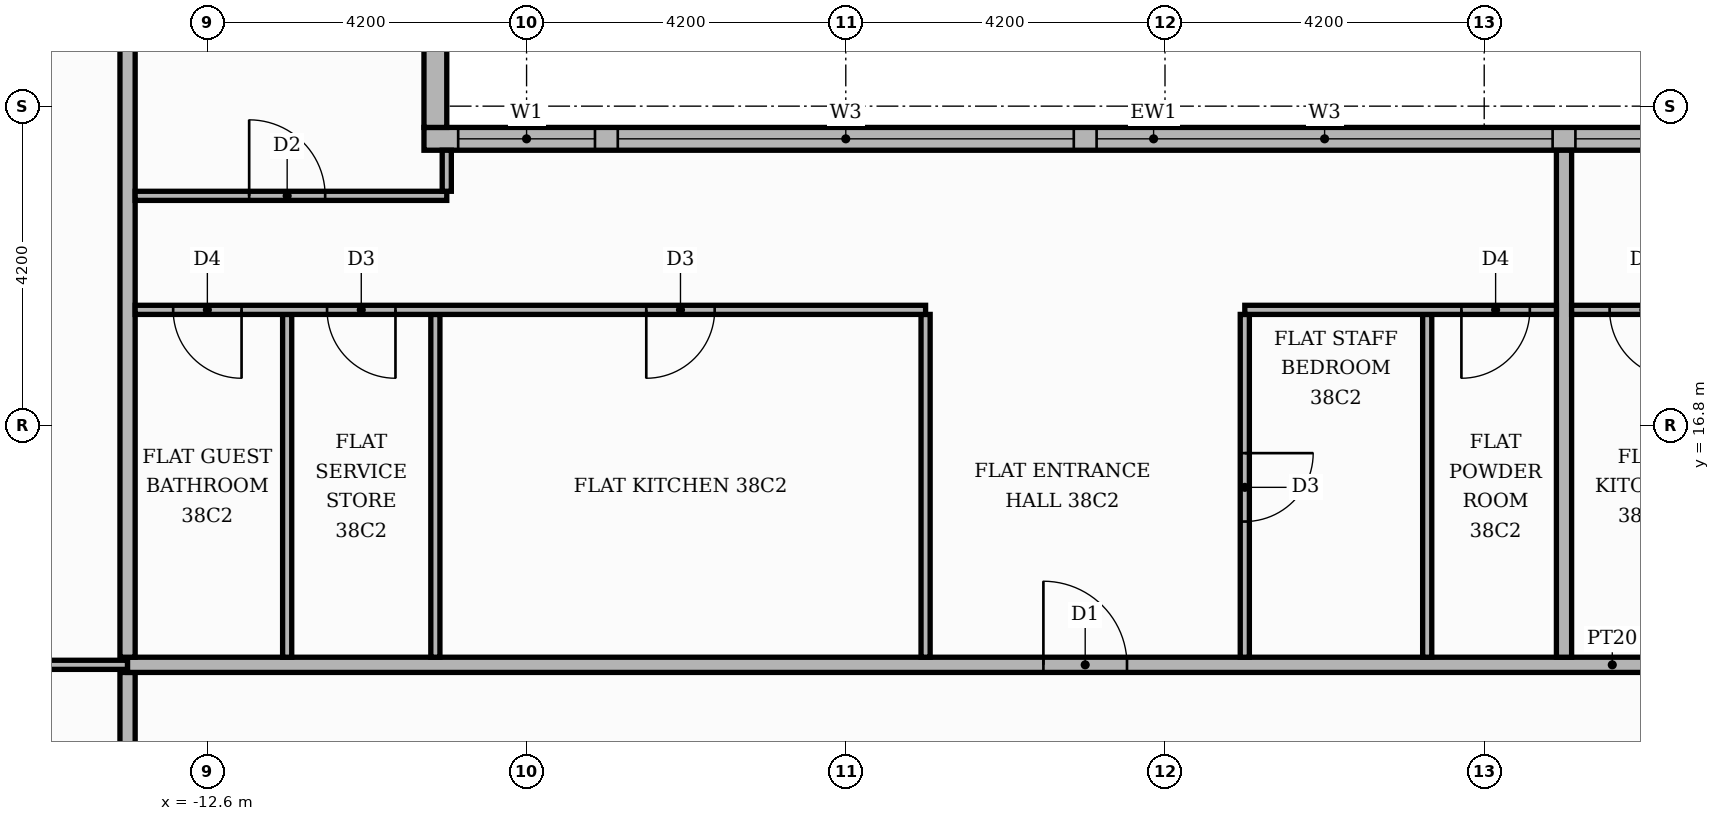
"""IFC4 building model, lengths in metres.
Left out: names, types, materials, properties, quantities, classifications, styles, units other than length and angle.
Written with IfcOpenShell. Run it as: python <this file> out.ifc"""

import sys

from ifc_helpers import new_model, si_unit, direction, frame, frame_2d, origin, place, context, subcontext, project, spatial, rectangle, extrude, element, fill, save


model = new_model("IFC4")
c1 = context("Model", 3, precision=1e-05, world=origin(), true_north=direction((0.0, 1.0)))
c2 = subcontext(c1, "Body", "Model", "MODEL_VIEW")
j1 = project(units=[si_unit("LENGTHUNIT", "METRE"), si_unit("PLANEANGLEUNIT", "RADIAN")], contexts=[c1])
p1 = place(None, origin())
s1 = spatial("IfcSite", under=j1, at=p1, CompositionType="ELEMENT")
p2 = place(p1, origin())
s2 = spatial("IfcBuilding", under=s1, at=p2, CompositionType="ELEMENT")
p3 = place(p2, frame((0.0, 0.0, 161.1)))
s3 = spatial("IfcBuildingStorey", under=s2, at=p3, CompositionType="ELEMENT", Elevation=161.1)
p4 = place(p3, frame((9.45, 20.57, 0.0), z_axis=(0.0, 0.0, 1.0), x_axis=(-1.0, 0.0, 0.0)))
e1 = element("IfcWall", 1, at=p4, inside=s3, PredefinedType="STANDARD", context=c2, shape_type="SweptSolid", body=[
    extrude(rectangle(XDim=19.2, YDim=0.3, at=frame_2d((9.6, 0.0))), origin(), (0.0, 0.0, 1.0), 3.48),
])
p5 = place(p4, frame((0.15, 0.0, 0.9)))
e2 = element("IfcOpeningElement", 2, at=p5, cuts=e1, PredefinedType="OPENING", context=c2, shape_type="SweptSolid", body=[
    extrude(rectangle(XDim=3.9, YDim=2.1, at=frame_2d((1.95, 1.05))), frame((0.0, 0.16, 0.0), z_axis=(0.0, -1.0, 0.0), x_axis=(1.0, 0.0, 0.0)), (0.0, 0.0, 1.0), 0.32),
])
p6 = place(p4, frame((4.35, 0.0, 0.9)))
e3 = element("IfcOpeningElement", 3, at=p6, cuts=e1, PredefinedType="OPENING", context=c2, shape_type="SweptSolid", body=[
    extrude(rectangle(XDim=6.0, YDim=2.1, at=frame_2d((3.0, 1.05))), frame((0.0, 0.16, 0.0), z_axis=(0.0, -1.0, 0.0), x_axis=(1.0, 0.0, 0.0)), (0.0, 0.0, 1.0), 0.32),
])
p7 = place(p4, frame((10.65, 0.0, 0.9)))
e4 = element("IfcOpeningElement", 4, at=p7, cuts=e1, PredefinedType="OPENING", context=c2, shape_type="SweptSolid", body=[
    extrude(rectangle(XDim=6.0, YDim=2.1, at=frame_2d((3.0, 1.05))), frame((0.0, 0.16, 0.0), z_axis=(0.0, -1.0, 0.0), x_axis=(1.0, 0.0, 0.0)), (0.0, 0.0, 1.0), 0.32),
])
p8 = place(p4, frame((16.95, 0.0, 0.9)))
e5 = element("IfcOpeningElement", 5, at=p8, cuts=e1, PredefinedType="OPENING", context=c2, shape_type="SweptSolid", body=[
    extrude(rectangle(XDim=1.8, YDim=2.1, at=frame_2d((0.9, 1.05))), frame((0.0, 0.16, 0.0), z_axis=(0.0, -1.0, 0.0), x_axis=(1.0, 0.0, 0.0)), (0.0, 0.0, 1.0), 0.32),
])
p9 = place(p3, frame((-9.6, 20.72, 0.0), z_axis=(0.0, 0.0, 1.0), x_axis=(0.0, 1.0, 0.0)))
e6 = element("IfcWall", 6, at=p9, inside=s3, PredefinedType="STANDARD", context=c2, shape_type="SweptSolid", body=[
    extrude(rectangle(XDim=5.0, YDim=0.3, at=frame_2d((2.5, 0.0))), origin(), (0.0, 0.0, 1.0), 3.48),
])
p10 = place(p9, frame((1.48, 0.0, 0.9)))
e7 = element("IfcOpeningElement", 7, at=p10, cuts=e6, PredefinedType="OPENING", context=c2, shape_type="SweptSolid", body=[
    extrude(rectangle(XDim=1.8, YDim=2.1, at=frame_2d((0.9, 1.05))), frame((0.0, 0.16, 0.0), z_axis=(0.0, -1.0, 0.0), x_axis=(1.0, 0.0, 0.0)), (0.0, 0.0, 1.0), 0.32),
])
p11 = place(p3, frame((-13.65, 11.1, 0.0), z_axis=(0.0, 0.0, 1.0), x_axis=(0.0, 1.0, 0.0)))
e8 = element("IfcWall", 8, at=p11, inside=s3, PredefinedType="PARTITIONING", context=c2, shape_type="SweptSolid", body=[
    extrude(rectangle(XDim=2.45, YDim=0.2, at=frame_2d((1.225, 0.0))), origin(), (0.0, 0.0, 1.0), 3.48),
])
p12 = place(p3, frame((-19.82, 13.65, 0.0), z_axis=(0.0, 0.0, 1.0), x_axis=(1.0, 0.0, 0.0)))
e9 = element("IfcWall", 9, at=p12, inside=s3, PredefinedType="PARTITIONING", context=c2, shape_type="SweptSolid", body=[
    extrude(rectangle(XDim=6.17, YDim=0.12, at=frame_2d((3.085, 0.0))), origin(), (0.0, 0.0, 1.0), 3.48),
])
p13 = place(p12, frame((2.635, 0.0, 0.0)))
e10 = element("IfcOpeningElement", 10, at=p13, cuts=e9, PredefinedType="OPENING", context=c2, shape_type="SweptSolid", body=[
    extrude(rectangle(XDim=0.9, YDim=2.1, at=frame_2d((0.45, 1.05))), frame((0.0, 0.07, 0.0), z_axis=(0.0, -1.0, 0.0), x_axis=(1.0, 0.0, 0.0)), (0.0, 0.0, 1.0), 0.14),
])
p14 = place(p3, frame((-13.65, 13.65, 0.0), z_axis=(0.0, 0.0, 1.0), x_axis=(1.0, 0.0, 0.0)))
e11 = element("IfcWall", 11, at=p14, inside=s3, PredefinedType="PARTITIONING", context=c2, shape_type="SweptSolid", body=[
    extrude(rectangle(XDim=39.07, YDim=0.2, at=frame_2d((19.535, 0.0))), origin(), (0.0, 0.0, 1.0), 3.48),
])
p15 = place(p14, frame((24.65, 0.0, 0.0)))
e12 = element("IfcOpeningElement", 12, at=p15, cuts=e11, PredefinedType="OPENING", context=c2, shape_type="SweptSolid", body=[
    extrude(rectangle(XDim=1.1, YDim=2.4, at=frame_2d((0.55, 1.2))), frame((0.0, 0.11, 0.0), z_axis=(0.0, -1.0, 0.0), x_axis=(1.0, 0.0, 0.0)), (0.0, 0.0, 1.0), 0.22),
])
p16 = place(p14, frame((12.05, 0.0, 0.0)))
e13 = element("IfcOpeningElement", 13, at=p16, cuts=e11, PredefinedType="OPENING", context=c2, shape_type="SweptSolid", body=[
    extrude(rectangle(XDim=1.1, YDim=2.4, at=frame_2d((0.55, 1.2))), frame((0.0, 0.11, 0.0), z_axis=(0.0, -1.0, 0.0), x_axis=(1.0, 0.0, 0.0)), (0.0, 0.0, 1.0), 0.22),
])
p17 = place(p3, frame((-13.65, 13.75, 0.0), z_axis=(0.0, 0.0, 1.0), x_axis=(0.0, 1.0, 0.0)))
e14 = element("IfcWall", 14, at=p17, inside=s3, PredefinedType="PARTITIONING", context=c2, shape_type="SweptSolid", body=[
    extrude(rectangle(XDim=11.67, YDim=0.2, at=frame_2d((5.835, 0.0))), origin(), (0.0, 0.0, 1.0), 3.48),
])
for number, where, z_axis, x_axis in (
    (15, (-11.55, 13.75, 0.0), (0.0, 0.0, 1.0), (0.0, 1.0, 0.0)),
    (16, (-9.6, 13.75, 0.0), (0.0, 0.0, 1.0), (0.0, 1.0, 0.0)),
    (17, (-3.15, 13.75, 0.0), (0.0, 0.0, 1.0), (0.0, 1.0, 0.0)),
):
    element("IfcWall", number, at=place(p3, frame(where, z_axis=z_axis, x_axis=x_axis)), inside=s3, PredefinedType="PARTITIONING", context=c2, shape_type="SweptSolid", body=[
        extrude(rectangle(XDim=4.51, YDim=0.12, at=frame_2d((2.255, 0.0))), origin(), (0.0, 0.0, 1.0), 3.48),
    ])
p18 = place(p3, frame((1.05, 13.75, 0.0), z_axis=(0.0, 0.0, 1.0), x_axis=(0.0, 1.0, 0.0)))
e18 = element("IfcWall", 18, at=p18, inside=s3, PredefinedType="PARTITIONING", context=c2, shape_type="SweptSolid", body=[
    extrude(rectangle(XDim=4.51, YDim=0.12, at=frame_2d((2.255, 0.0))), origin(), (0.0, 0.0, 1.0), 3.48),
])
p19 = place(p18, frame((1.785, 0.0, 0.0)))
e19 = element("IfcOpeningElement", 19, at=p19, cuts=e18, PredefinedType="OPENING", context=c2, shape_type="SweptSolid", body=[
    extrude(rectangle(XDim=0.9, YDim=2.1, at=frame_2d((0.45, 1.05))), frame((0.0, 0.07, 0.0), z_axis=(0.0, -1.0, 0.0), x_axis=(1.0, 0.0, 0.0)), (0.0, 0.0, 1.0), 0.14),
])
p20 = place(p3, frame((3.45, 13.75, 0.0), z_axis=(0.0, 0.0, 1.0), x_axis=(0.0, 1.0, 0.0)))
e20 = element("IfcWall", 20, at=p20, inside=s3, PredefinedType="PARTITIONING", context=c2, shape_type="SweptSolid", body=[
    extrude(rectangle(XDim=4.51, YDim=0.12, at=frame_2d((2.255, 0.0))), origin(), (0.0, 0.0, 1.0), 3.48),
])
p21 = place(p3, frame((5.25, 13.75, 0.0), z_axis=(0.0, 0.0, 1.0), x_axis=(0.0, 1.0, 0.0)))
e21 = element("IfcWall", 21, at=p21, inside=s3, PredefinedType="PARTITIONING", context=c2, shape_type="SweptSolid", body=[
    extrude(rectangle(XDim=6.67, YDim=0.2, at=frame_2d((3.335, 0.0))), origin(), (0.0, 0.0, 1.0), 3.48),
])
p22 = place(p3, frame((-13.55, 18.32, 0.0), z_axis=(0.0, 0.0, 1.0), x_axis=(1.0, 0.0, 0.0)))
e22 = element("IfcWall", 22, at=p22, inside=s3, PredefinedType="PARTITIONING", context=c2, shape_type="SweptSolid", body=[
    extrude(rectangle(XDim=10.4, YDim=0.12, at=frame_2d((5.2, 0.0))), origin(), (0.0, 0.0, 1.0), 3.48),
])
p23 = place(p22, frame((6.725, 0.0, 0.0)))
e23 = element("IfcOpeningElement", 23, at=p23, cuts=e22, PredefinedType="OPENING", context=c2, shape_type="SweptSolid", body=[
    extrude(rectangle(XDim=0.9, YDim=2.1, at=frame_2d((0.45, 1.05))), frame((0.0, 0.07, 0.0), z_axis=(0.0, -1.0, 0.0), x_axis=(1.0, 0.0, 0.0)), (0.0, 0.0, 1.0), 0.14),
])
p24 = place(p22, frame((2.525, 0.0, 0.0)))
e24 = element("IfcOpeningElement", 24, at=p24, cuts=e22, PredefinedType="OPENING", context=c2, shape_type="SweptSolid", body=[
    extrude(rectangle(XDim=0.9, YDim=2.1, at=frame_2d((0.45, 1.05))), frame((0.0, 0.07, 0.0), z_axis=(0.0, -1.0, 0.0), x_axis=(1.0, 0.0, 0.0)), (0.0, 0.0, 1.0), 0.14),
])
p25 = place(p22, frame((0.5, 0.0, 0.0)))
e25 = element("IfcOpeningElement", 25, at=p25, cuts=e22, PredefinedType="OPENING", context=c2, shape_type="SweptSolid", body=[
    extrude(rectangle(XDim=0.9, YDim=2.1, at=frame_2d((0.45, 1.05))), frame((0.0, 0.07, 0.0), z_axis=(0.0, -1.0, 0.0), x_axis=(1.0, 0.0, 0.0)), (0.0, 0.0, 1.0), 0.14),
])
p26 = place(p3, frame((1.05, 18.32, 0.0), z_axis=(0.0, 0.0, 1.0), x_axis=(1.0, 0.0, 0.0)))
e26 = element("IfcWall", 26, at=p26, inside=s3, PredefinedType="PARTITIONING", context=c2, shape_type="SweptSolid", body=[
    extrude(rectangle(XDim=4.1, YDim=0.12, at=frame_2d((2.05, 0.0))), origin(), (0.0, 0.0, 1.0), 3.48),
])
p27 = place(p26, frame((2.85, 0.0, 0.0)))
e27 = element("IfcOpeningElement", 27, at=p27, cuts=e26, PredefinedType="OPENING", context=c2, shape_type="SweptSolid", body=[
    extrude(rectangle(XDim=0.9, YDim=2.1, at=frame_2d((0.45, 1.05))), frame((0.0, 0.07, 0.0), z_axis=(0.0, -1.0, 0.0), x_axis=(1.0, 0.0, 0.0)), (0.0, 0.0, 1.0), 0.14),
])
p28 = place(p3, frame((5.35, 18.32, 0.0), z_axis=(0.0, 0.0, 1.0), x_axis=(1.0, 0.0, 0.0)))
e28 = element("IfcWall", 28, at=p28, inside=s3, PredefinedType="PARTITIONING", context=c2, shape_type="SweptSolid", body=[
    extrude(rectangle(XDim=4.1, YDim=0.12, at=frame_2d((2.05, 0.0))), origin(), (0.0, 0.0, 1.0), 3.48),
])
p29 = place(p28, frame((0.5, 0.0, 0.0)))
e29 = element("IfcOpeningElement", 29, at=p29, cuts=e28, PredefinedType="OPENING", context=c2, shape_type="SweptSolid", body=[
    extrude(rectangle(XDim=0.9, YDim=2.1, at=frame_2d((0.45, 1.05))), frame((0.0, 0.07, 0.0), z_axis=(0.0, -1.0, 0.0), x_axis=(1.0, 0.0, 0.0)), (0.0, 0.0, 1.0), 0.14),
])
p30 = place(p3, frame((-13.55, 19.82, 0.0), z_axis=(0.0, 0.0, 1.0), x_axis=(1.0, 0.0, 0.0)))
e30 = element("IfcWall", 30, at=p30, inside=s3, PredefinedType="PARTITIONING", context=c2, shape_type="SweptSolid", body=[
    extrude(rectangle(XDim=4.1, YDim=0.12, at=frame_2d((2.05, 0.0))), origin(), (0.0, 0.0, 1.0), 3.48),
])
p31 = place(p30, frame((1.5, 0.0, 0.0)))
e31 = element("IfcOpeningElement", 31, at=p31, cuts=e30, PredefinedType="OPENING", context=c2, shape_type="SweptSolid", body=[
    extrude(rectangle(XDim=1.0, YDim=2.1, at=frame_2d((0.5, 1.05))), frame((0.0, 0.07, 0.0), z_axis=(0.0, -1.0, 0.0), x_axis=(1.0, 0.0, 0.0)), (0.0, 0.0, 1.0), 0.14),
])
p32 = place(p3, frame((-9.45, 19.88, 0.0), z_axis=(0.0, 0.0, 1.0), x_axis=(0.0, 1.0, 0.0)))
e32 = element("IfcWall", 32, at=p32, inside=s3, PredefinedType="PARTITIONING", context=c2, shape_type="SweptSolid", body=[
    extrude(rectangle(XDim=0.54, YDim=0.12, at=frame_2d((0.27, 0.0))), origin(), (0.0, 0.0, 1.0), 3.48),
])
p33 = place(p5, origin())
e33 = element("IfcWindow", 33, at=p33, inside=s3, PartitioningType="SINGLE_PANEL", PredefinedType="WINDOW", context=c2, shape_type="SweptSolid", body=[
    extrude(rectangle(XDim=3.9, YDim=2.1, at=frame_2d((1.95, 1.05))), frame((0.0, 0.03, 0.0), z_axis=(0.0, -1.0, 0.0), x_axis=(1.0, 0.0, 0.0)), (0.0, 0.0, 1.0), 0.06),
])
fill(e2, e33)
p34 = place(p6, origin())
e34 = element("IfcWindow", 34, at=p34, inside=s3, PartitioningType="SINGLE_PANEL", PredefinedType="WINDOW", context=c2, shape_type="SweptSolid", body=[
    extrude(rectangle(XDim=6.0, YDim=2.1, at=frame_2d((3.0, 1.05))), frame((0.0, 0.03, 0.0), z_axis=(0.0, -1.0, 0.0), x_axis=(1.0, 0.0, 0.0)), (0.0, 0.0, 1.0), 0.06),
])
fill(e3, e34)
p35 = place(p7, origin())
e35 = element("IfcWindow", 35, at=p35, inside=s3, PartitioningType="SINGLE_PANEL", PredefinedType="WINDOW", context=c2, shape_type="SweptSolid", body=[
    extrude(rectangle(XDim=6.0, YDim=2.1, at=frame_2d((3.0, 1.05))), frame((0.0, 0.03, 0.0), z_axis=(0.0, -1.0, 0.0), x_axis=(1.0, 0.0, 0.0)), (0.0, 0.0, 1.0), 0.06),
])
fill(e4, e35)
p36 = place(p8, origin())
e36 = element("IfcWindow", 36, at=p36, inside=s3, PartitioningType="SINGLE_PANEL", PredefinedType="WINDOW", context=c2, shape_type="SweptSolid", body=[
    extrude(rectangle(XDim=1.8, YDim=2.1, at=frame_2d((0.9, 1.05))), frame((0.0, 0.03, 0.0), z_axis=(0.0, -1.0, 0.0), x_axis=(1.0, 0.0, 0.0)), (0.0, 0.0, 1.0), 0.06),
])
fill(e5, e36)
p37 = place(p29, frame((0.9, 0.0, 0.0), z_axis=(0.0, 0.0, 1.0), x_axis=(-1.0, 0.0, 0.0)))
e37 = element("IfcDoor", 37, at=p37, inside=s3, OperationType="SINGLE_SWING_RIGHT", PredefinedType="DOOR", context=c2, shape_type="SweptSolid", body=[
    extrude(rectangle(XDim=0.9, YDim=2.1, at=frame_2d((0.45, 1.05))), frame((0.0, 0.025, 0.0), z_axis=(0.0, -1.0, 0.0), x_axis=(1.0, 0.0, 0.0)), (0.0, 0.0, 1.0), 0.05),
])
fill(e29, e37)
p38 = place(p16, origin())
e38 = element("IfcDoor", 38, at=p38, inside=s3, OperationType="SINGLE_SWING_LEFT", PredefinedType="DOOR", context=c2, shape_type="SweptSolid", body=[
    extrude(rectangle(XDim=1.1, YDim=2.4, at=frame_2d((0.55, 1.2))), frame((0.0, 0.025, 0.0), z_axis=(0.0, -1.0, 0.0), x_axis=(1.0, 0.0, 0.0)), (0.0, 0.0, 1.0), 0.05),
])
fill(e13, e38)
p39 = place(p27, frame((0.9, 0.0, 0.0), z_axis=(0.0, 0.0, 1.0), x_axis=(-1.0, 0.0, 0.0)))
e39 = element("IfcDoor", 39, at=p39, inside=s3, OperationType="SINGLE_SWING_LEFT", PredefinedType="DOOR", context=c2, shape_type="SweptSolid", body=[
    extrude(rectangle(XDim=0.9, YDim=2.1, at=frame_2d((0.45, 1.05))), frame((0.0, 0.025, 0.0), z_axis=(0.0, -1.0, 0.0), x_axis=(1.0, 0.0, 0.0)), (0.0, 0.0, 1.0), 0.05),
])
fill(e27, e39)
p40 = place(p19, frame((0.9, 0.0, 0.0), z_axis=(0.0, 0.0, 1.0), x_axis=(-1.0, 0.0, 0.0)))
e40 = element("IfcDoor", 40, at=p40, inside=s3, OperationType="SINGLE_SWING_RIGHT", PredefinedType="DOOR", context=c2, shape_type="SweptSolid", body=[
    extrude(rectangle(XDim=0.9, YDim=2.1, at=frame_2d((0.45, 1.05))), frame((0.0, 0.025, 0.0), z_axis=(0.0, -1.0, 0.0), x_axis=(1.0, 0.0, 0.0)), (0.0, 0.0, 1.0), 0.05),
])
fill(e19, e40)
p41 = place(p23, frame((0.9, 0.0, 0.0), z_axis=(0.0, 0.0, 1.0), x_axis=(-1.0, 0.0, 0.0)))
e41 = element("IfcDoor", 41, at=p41, inside=s3, OperationType="SINGLE_SWING_LEFT", PredefinedType="DOOR", context=c2, shape_type="SweptSolid", body=[
    extrude(rectangle(XDim=0.9, YDim=2.1, at=frame_2d((0.45, 1.05))), frame((0.0, 0.025, 0.0), z_axis=(0.0, -1.0, 0.0), x_axis=(1.0, 0.0, 0.0)), (0.0, 0.0, 1.0), 0.05),
])
fill(e23, e41)
p42 = place(p24, frame((0.9, 0.0, 0.0), z_axis=(0.0, 0.0, 1.0), x_axis=(-1.0, 0.0, 0.0)))
e42 = element("IfcDoor", 42, at=p42, inside=s3, OperationType="SINGLE_SWING_RIGHT", PredefinedType="DOOR", context=c2, shape_type="SweptSolid", body=[
    extrude(rectangle(XDim=0.9, YDim=2.1, at=frame_2d((0.45, 1.05))), frame((0.0, 0.025, 0.0), z_axis=(0.0, -1.0, 0.0), x_axis=(1.0, 0.0, 0.0)), (0.0, 0.0, 1.0), 0.05),
])
fill(e24, e42)
p43 = place(p25, frame((0.9, 0.0, 0.0), z_axis=(0.0, 0.0, 1.0), x_axis=(-1.0, 0.0, 0.0)))
e43 = element("IfcDoor", 43, at=p43, inside=s3, OperationType="SINGLE_SWING_RIGHT", PredefinedType="DOOR", context=c2, shape_type="SweptSolid", body=[
    extrude(rectangle(XDim=0.9, YDim=2.1, at=frame_2d((0.45, 1.05))), frame((0.0, 0.025, 0.0), z_axis=(0.0, -1.0, 0.0), x_axis=(1.0, 0.0, 0.0)), (0.0, 0.0, 1.0), 0.05),
])
fill(e25, e43)
p44 = place(p31, origin())
e44 = element("IfcDoor", 44, at=p44, inside=s3, OperationType="SINGLE_SWING_LEFT", PredefinedType="DOOR", context=c2, shape_type="SweptSolid", body=[
    extrude(rectangle(XDim=1.0, YDim=2.1, at=frame_2d((0.5, 1.05))), frame((0.0, 0.025, 0.0), z_axis=(0.0, -1.0, 0.0), x_axis=(1.0, 0.0, 0.0)), (0.0, 0.0, 1.0), 0.05),
])
fill(e31, e44)
save(model, sys.argv[1])
